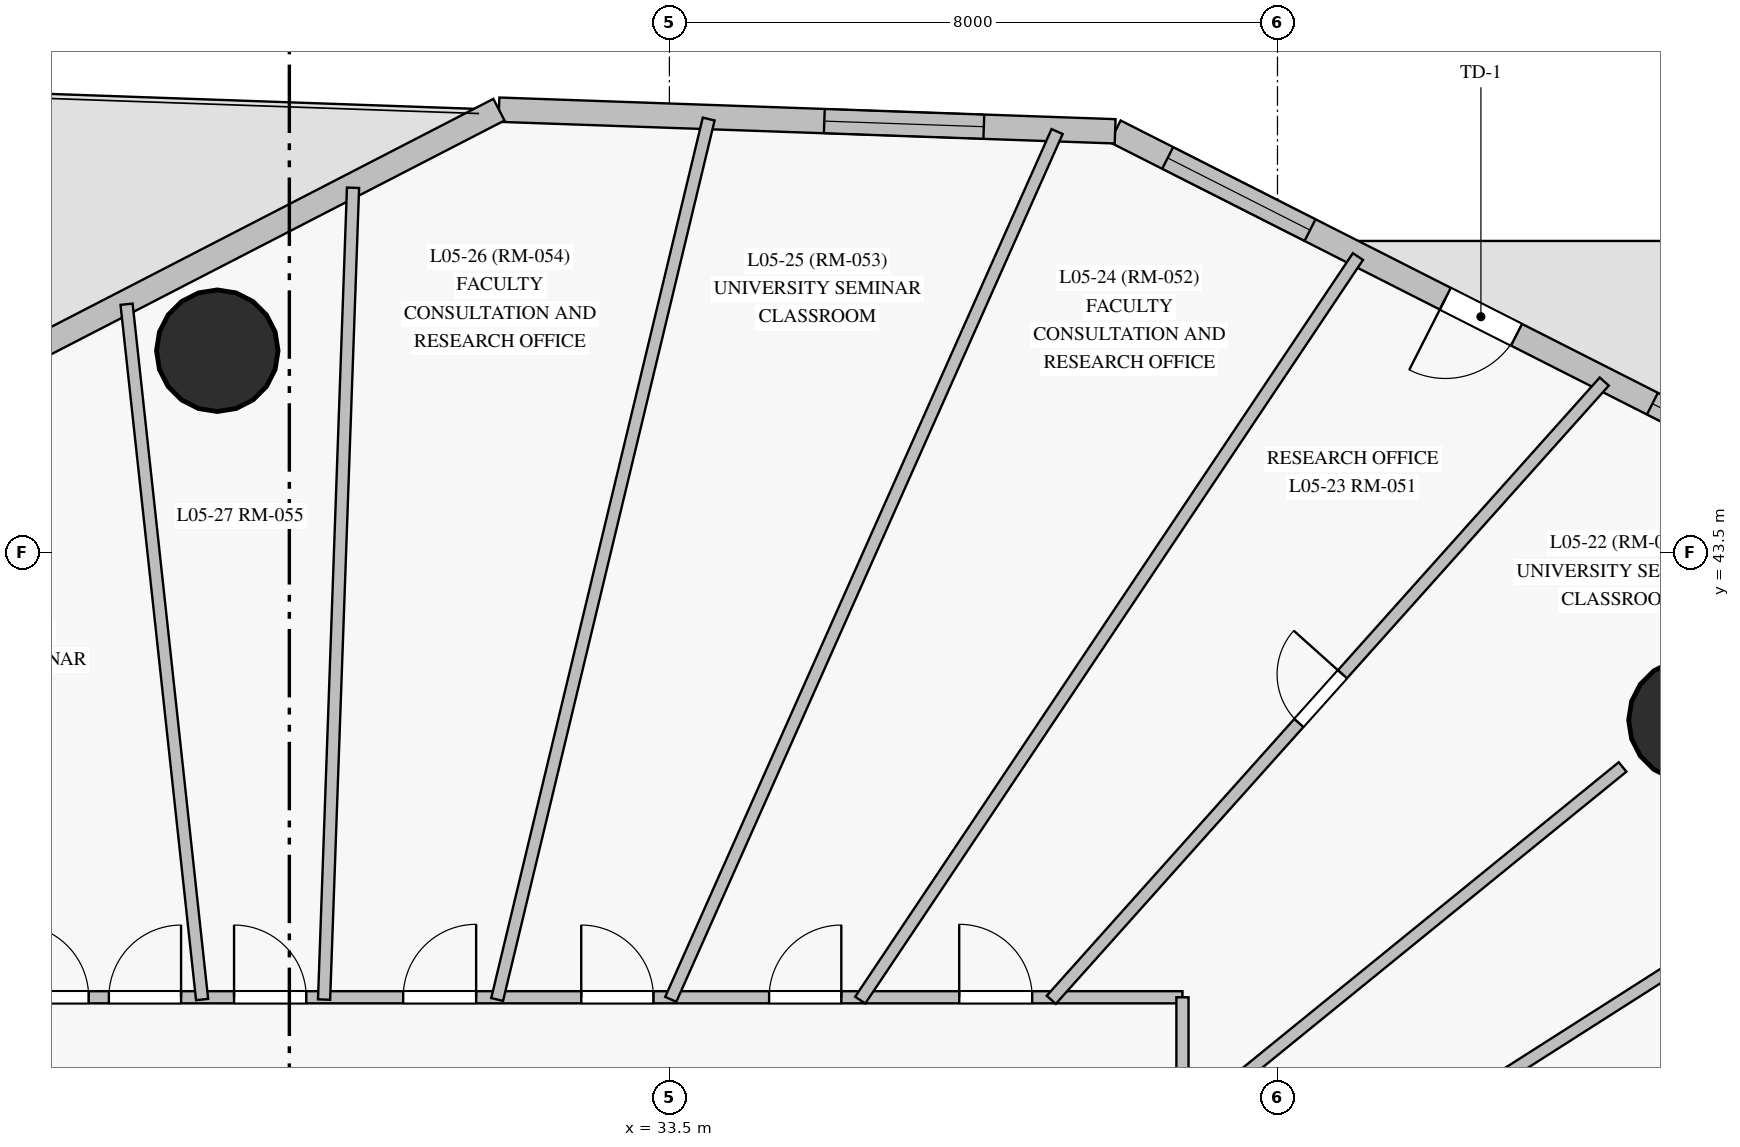
"""IFC4 building model, lengths in metres.
Left out: names, types, materials, properties, quantities, classifications, styles, units other than length and angle.
Written with IfcOpenShell. Run it as: python <this file> out.ifc"""

import sys

from ifc_helpers import new_model, si_unit, direction, frame, frame_2d, origin, origin_with_axes, origin_2d, place, context, subcontext, project, spatial, rectangle, circle, extrude, source, transform, mapped, element, fill, save


model = new_model("IFC4")
c1 = context("Model", 3, precision=1e-05, world=origin(), true_north=direction((0.0, 1.0)))
c2 = subcontext(c1, "Body", "Model", "MODEL_VIEW")
j1 = project(units=[si_unit("LENGTHUNIT", "METRE"), si_unit("PLANEANGLEUNIT", "RADIAN")], contexts=[c1])
p1 = place(None, origin())
s1 = spatial("IfcSite", under=j1, at=p1, CompositionType="ELEMENT")
p2 = place(p1, origin())
s2 = spatial("IfcBuilding", under=s1, at=p2, CompositionType="ELEMENT")
p3 = place(p2, frame((0.0, 0.0, 22.5)))
s3 = spatial("IfcBuildingStorey", under=s2, at=p3, CompositionType="ELEMENT", Elevation=22.5)
m1 = source(origin_with_axes(), c2, "Body", "SweptSolid", [
    extrude(circle(Radius=0.8, at=origin_2d()), origin(), (0.0, 0.0, 1.0), 4.0),
])
for number, where, z_axis, x_axis in (
    (1, (46.92, 41.296, 0.0), (0.0, 0.0, 1.0), (1.0, 0.0, 0.0)),
    (2, (27.552, 46.156, 0.0), (0.0, 0.0, 1.0), (1.0, 0.0, 0.0)),
):
    element("IfcColumn", number, at=place(p3, frame(where, z_axis=z_axis, x_axis=x_axis)), inside=s3, PredefinedType="COLUMN", context=c2, shape_type="MappedRepresentation", body=[
        mapped(m1, transform((0.0, 0.0, 0.0), scale=1.0)),
    ])
p4 = place(p3, frame((48.989, 44.164, 0.0), z_axis=(0.0, 0.0, 1.0), x_axis=(-0.891951959997, 0.452130181539, 0.0)))
e3 = element("IfcWall", 3, at=p4, inside=s3, PredefinedType="SOLIDWALL", context=c2, shape_type="SweptSolid", body=[
    extrude(rectangle(XDim=10.79, YDim=0.32, at=frame_2d((5.395, 0.0))), origin(), (0.0, 0.0, 1.0), 3.75),
])
p5 = place(p4, frame((0.766, 0.0, 0.85)))
e4 = element("IfcOpeningElement", 4, at=p5, cuts=e3, PredefinedType="OPENING", context=c2, shape_type="SweptSolid", body=[
    extrude(rectangle(XDim=2.1, YDim=1.95, at=frame_2d((1.05, 0.975))), frame((0.0, 0.17, 0.0), z_axis=(0.0, -1.0, 0.0), x_axis=(1.0, 0.0, 0.0)), (0.0, 0.0, 1.0), 0.34),
])
p6 = place(p4, frame((7.916, 0.0, 0.85)))
e5 = element("IfcOpeningElement", 5, at=p6, cuts=e3, PredefinedType="OPENING", context=c2, shape_type="SweptSolid", body=[
    extrude(rectangle(XDim=2.1, YDim=1.95, at=frame_2d((1.05, 0.975))), frame((0.0, 0.17, 0.0), z_axis=(0.0, -1.0, 0.0), x_axis=(1.0, 0.0, 0.0)), (0.0, 0.0, 1.0), 0.34),
])
p7 = place(p4, frame((4.87, 0.0, 0.0)))
e6 = element("IfcOpeningElement", 6, at=p7, cuts=e3, PredefinedType="OPENING", context=c2, shape_type="SweptSolid", body=[
    extrude(rectangle(XDim=1.05, YDim=2.12, at=frame_2d((0.525, 1.06))), frame((0.0, 0.17, 0.0), z_axis=(0.0, -1.0, 0.0), x_axis=(1.0, 0.0, 0.0)), (0.0, 0.0, 1.0), 0.34),
])
p8 = place(p3, frame((39.364, 49.042, 0.0), z_axis=(0.0, 0.0, 1.0), x_axis=(-0.999384031187, 0.035093563631, 0.0)))
e7 = element("IfcWall", 7, at=p8, inside=s3, PredefinedType="SOLIDWALL", context=c2, shape_type="SweptSolid", body=[
    extrude(rectangle(XDim=8.112, YDim=0.32, at=frame_2d((4.056, 0.0))), origin(), (0.0, 0.0, 1.0), 3.75),
])
p9 = place(p8, frame((1.729, 0.0, 0.85)))
e8 = element("IfcOpeningElement", 8, at=p9, cuts=e7, PredefinedType="OPENING", context=c2, shape_type="SweptSolid", body=[
    extrude(rectangle(XDim=2.1, YDim=1.95, at=frame_2d((1.05, 0.975))), frame((0.0, 0.17, 0.0), z_axis=(0.0, -1.0, 0.0), x_axis=(1.0, 0.0, 0.0)), (0.0, 0.0, 1.0), 0.34),
])
p10 = place(p3, frame((31.258, 49.327, 0.0), z_axis=(0.0, 0.0, 1.0), x_axis=(-0.888776453035, -0.458340939182, 0.0)))
e9 = element("IfcWall", 9, at=p10, inside=s3, PredefinedType="SOLIDWALL", context=c2, shape_type="SweptSolid", body=[
    extrude(rectangle(XDim=25.827, YDim=0.32, at=frame_2d((12.913, 0.0))), origin(), (0.0, 0.0, 1.0), 3.42),
])
p11 = place(p10, frame((13.281, 0.0, 0.85)))
e10 = element("IfcOpeningElement", 10, at=p11, cuts=e9, PredefinedType="OPENING", context=c2, shape_type="SweptSolid", body=[
    extrude(rectangle(XDim=2.1, YDim=1.95, at=frame_2d((1.05, 0.975))), frame((0.0, 0.17, 0.0), z_axis=(0.0, -1.0, 0.0), x_axis=(1.0, 0.0, 0.0)), (0.0, 0.0, 1.0), 0.34),
])
p12 = place(p10, frame((9.16, 0.0, 0.0)))
e11 = element("IfcOpeningElement", 11, at=p12, cuts=e9, PredefinedType="OPENING", context=c2, shape_type="SweptSolid", body=[
    extrude(rectangle(XDim=1.05, YDim=2.12, at=frame_2d((0.525, 1.06))), frame((0.0, 0.17, 0.0), z_axis=(0.0, -1.0, 0.0), x_axis=(1.0, 0.0, 0.0)), (0.0, 0.0, 1.0), 0.34),
])
p13 = place(p3, frame((10.5, 37.65, 0.0), z_axis=(0.0, 0.0, 1.0), x_axis=(1.0, 0.0, 0.0)))
e12 = element("IfcWall", 12, at=p13, inside=s3, PredefinedType="PARTITIONING", context=c2, shape_type="SweptSolid", body=[
    extrude(rectangle(XDim=29.75, YDim=0.16, at=frame_2d((14.875, 0.0))), origin(), (0.0, 0.0, 1.0), 3.15),
])
p14 = place(p13, frame((26.813, 0.0, 0.0)))
e13 = element("IfcOpeningElement", 13, at=p14, cuts=e12, PredefinedType="OPENING", context=c2, shape_type="SweptSolid", body=[
    extrude(rectangle(XDim=0.96, YDim=2.15, at=frame_2d((0.48, 1.075))), frame((0.0, 0.09, 0.0), z_axis=(0.0, -1.0, 0.0), x_axis=(1.0, 0.0, 0.0)), (0.0, 0.0, 1.0), 0.18),
])
p15 = place(p13, frame((24.312, 0.0, 0.0)))
e14 = element("IfcOpeningElement", 14, at=p15, cuts=e12, PredefinedType="OPENING", context=c2, shape_type="SweptSolid", body=[
    extrude(rectangle(XDim=0.95, YDim=2.15, at=frame_2d((0.475, 1.075))), frame((0.0, 0.09, 0.0), z_axis=(0.0, -1.0, 0.0), x_axis=(1.0, 0.0, 0.0)), (0.0, 0.0, 1.0), 0.18),
])
p16 = place(p13, frame((21.84, 0.0, 0.0)))
e15 = element("IfcOpeningElement", 15, at=p16, cuts=e12, PredefinedType="OPENING", context=c2, shape_type="SweptSolid", body=[
    extrude(rectangle(XDim=0.95, YDim=2.15, at=frame_2d((0.475, 1.075))), frame((0.0, 0.09, 0.0), z_axis=(0.0, -1.0, 0.0), x_axis=(1.0, 0.0, 0.0)), (0.0, 0.0, 1.0), 0.18),
])
p17 = place(p13, frame((19.498, 0.0, 0.0)))
e16 = element("IfcOpeningElement", 16, at=p17, cuts=e12, PredefinedType="OPENING", context=c2, shape_type="SweptSolid", body=[
    extrude(rectangle(XDim=0.96, YDim=2.15, at=frame_2d((0.48, 1.075))), frame((0.0, 0.09, 0.0), z_axis=(0.0, -1.0, 0.0), x_axis=(1.0, 0.0, 0.0)), (0.0, 0.0, 1.0), 0.18),
])
p18 = place(p13, frame((17.272, 0.0, 0.0)))
e17 = element("IfcOpeningElement", 17, at=p18, cuts=e12, PredefinedType="OPENING", context=c2, shape_type="SweptSolid", body=[
    extrude(rectangle(XDim=0.95, YDim=2.15, at=frame_2d((0.475, 1.075))), frame((0.0, 0.09, 0.0), z_axis=(0.0, -1.0, 0.0), x_axis=(1.0, 0.0, 0.0)), (0.0, 0.0, 1.0), 0.18),
])
p19 = place(p13, frame((15.625, 0.0, 0.0)))
e18 = element("IfcOpeningElement", 18, at=p19, cuts=e12, PredefinedType="OPENING", context=c2, shape_type="SweptSolid", body=[
    extrude(rectangle(XDim=0.95, YDim=2.15, at=frame_2d((0.475, 1.075))), frame((0.0, 0.09, 0.0), z_axis=(0.0, -1.0, 0.0), x_axis=(1.0, 0.0, 0.0)), (0.0, 0.0, 1.0), 0.18),
])
p20 = place(p13, frame((14.4, 0.0, 0.0)))
e19 = element("IfcOpeningElement", 19, at=p20, cuts=e12, PredefinedType="OPENING", context=c2, shape_type="SweptSolid", body=[
    extrude(rectangle(XDim=0.96, YDim=2.15, at=frame_2d((0.48, 1.075))), frame((0.0, 0.09, 0.0), z_axis=(0.0, -1.0, 0.0), x_axis=(1.0, 0.0, 0.0)), (0.0, 0.0, 1.0), 0.18),
])
p21 = place(p13, frame((9.938, 0.0, 0.0)))
e20 = element("IfcOpeningElement", 20, at=p21, cuts=e12, PredefinedType="OPENING", context=c2, shape_type="SweptSolid", body=[
    extrude(rectangle(XDim=0.95, YDim=2.15, at=frame_2d((0.475, 1.075))), frame((0.0, 0.09, 0.0), z_axis=(0.0, -1.0, 0.0), x_axis=(1.0, 0.0, 0.0)), (0.0, 0.0, 1.0), 0.18),
])
p22 = place(p3, frame((40.25, 37.65, 0.0), z_axis=(0.0, 0.0, 1.0), x_axis=(0.0, -1.0, 0.0)))
e21 = element("IfcWall", 21, at=p22, inside=s3, PredefinedType="PARTITIONING", context=c2, shape_type="SweptSolid", body=[
    extrude(rectangle(XDim=22.3, YDim=0.16, at=frame_2d((11.15, 0.0))), origin(), (0.0, 0.0, 1.0), 3.15),
])
p23 = place(p22, frame((16.25, 0.0, 0.0)))
e22 = element("IfcOpeningElement", 22, at=p23, cuts=e21, PredefinedType="OPENING", context=c2, shape_type="SweptSolid", body=[
    extrude(rectangle(XDim=0.95, YDim=2.15, at=frame_2d((0.475, 1.075))), frame((0.0, 0.09, 0.0), z_axis=(0.0, -1.0, 0.0), x_axis=(1.0, 0.0, 0.0)), (0.0, 0.0, 1.0), 0.18),
])
p24 = place(p22, frame((14.06, 0.0, 0.0)))
e23 = element("IfcOpeningElement", 23, at=p24, cuts=e21, PredefinedType="OPENING", context=c2, shape_type="SweptSolid", body=[
    extrude(rectangle(XDim=0.96, YDim=2.15, at=frame_2d((0.48, 1.075))), frame((0.0, 0.09, 0.0), z_axis=(0.0, -1.0, 0.0), x_axis=(1.0, 0.0, 0.0)), (0.0, 0.0, 1.0), 0.18),
])
p25 = place(p22, frame((12.235, 0.0, 0.0)))
e24 = element("IfcOpeningElement", 24, at=p25, cuts=e21, PredefinedType="OPENING", context=c2, shape_type="SweptSolid", body=[
    extrude(rectangle(XDim=0.95, YDim=2.15, at=frame_2d((0.475, 1.075))), frame((0.0, 0.09, 0.0), z_axis=(0.0, -1.0, 0.0), x_axis=(1.0, 0.0, 0.0)), (0.0, 0.0, 1.0), 0.18),
])
p26 = place(p22, frame((4.385, 0.0, 0.0)))
e25 = element("IfcOpeningElement", 25, at=p26, cuts=e21, PredefinedType="OPENING", context=c2, shape_type="SweptSolid", body=[
    extrude(rectangle(XDim=0.95, YDim=2.15, at=frame_2d((0.475, 1.075))), frame((0.0, 0.09, 0.0), z_axis=(0.0, -1.0, 0.0), x_axis=(1.0, 0.0, 0.0)), (0.0, 0.0, 1.0), 0.18),
])
p27 = place(p22, frame((2.19, 0.0, 0.0)))
e26 = element("IfcOpeningElement", 26, at=p27, cuts=e21, PredefinedType="OPENING", context=c2, shape_type="SweptSolid", body=[
    extrude(rectangle(XDim=0.95, YDim=2.15, at=frame_2d((0.475, 1.075))), frame((0.0, 0.09, 0.0), z_axis=(0.0, -1.0, 0.0), x_axis=(1.0, 0.0, 0.0)), (0.0, 0.0, 1.0), 0.18),
])
p28 = place(p22, frame((17.358, 0.0, 0.0)))
e27 = element("IfcOpeningElement", 27, at=p28, cuts=e21, PredefinedType="OPENING", context=c2, shape_type="SweptSolid", body=[
    extrude(rectangle(XDim=0.95, YDim=2.15, at=frame_2d((0.475, 1.075))), frame((0.0, 0.09, 0.0), z_axis=(0.0, -1.0, 0.0), x_axis=(1.0, 0.0, 0.0)), (0.0, 0.0, 1.0), 0.18),
])
p29 = place(p22, frame((18.489, 0.0, 0.0)))
e28 = element("IfcOpeningElement", 28, at=p29, cuts=e21, PredefinedType="OPENING", context=c2, shape_type="SweptSolid", body=[
    extrude(rectangle(XDim=0.95, YDim=2.15, at=frame_2d((0.475, 1.075))), frame((0.0, 0.09, 0.0), z_axis=(0.0, -1.0, 0.0), x_axis=(1.0, 0.0, 0.0)), (0.0, 0.0, 1.0), 0.18),
])
p30 = place(p22, frame((10.61, 0.0, 0.0)))
e29 = element("IfcOpeningElement", 29, at=p30, cuts=e21, PredefinedType="OPENING", context=c2, shape_type="SweptSolid", body=[
    extrude(rectangle(XDim=0.86, YDim=2.04, at=frame_2d((0.43, 1.02))), frame((0.0, 0.09, 0.0), z_axis=(0.0, -1.0, 0.0), x_axis=(1.0, 0.0, 0.0)), (0.0, 0.0, 1.0), 0.18),
])
p31 = place(p22, frame((8.378, 0.0, 0.0)))
e30 = element("IfcOpeningElement", 30, at=p31, cuts=e21, PredefinedType="OPENING", context=c2, shape_type="SweptSolid", body=[
    extrude(rectangle(XDim=0.86, YDim=2.04, at=frame_2d((0.43, 1.02))), frame((0.0, 0.09, 0.0), z_axis=(0.0, -1.0, 0.0), x_axis=(1.0, 0.0, 0.0)), (0.0, 0.0, 1.0), 0.18),
])
p32 = place(p22, frame((7.144, 0.0, 0.0)))
e31 = element("IfcOpeningElement", 31, at=p32, cuts=e21, PredefinedType="OPENING", context=c2, shape_type="SweptSolid", body=[
    extrude(rectangle(XDim=0.86, YDim=2.04, at=frame_2d((0.43, 1.02))), frame((0.0, 0.09, 0.0), z_axis=(0.0, -1.0, 0.0), x_axis=(1.0, 0.0, 0.0)), (0.0, 0.0, 1.0), 0.18),
])
p33 = place(p3, frame((40.209, 31.855, 0.0), z_axis=(0.0, 0.0, 1.0), x_axis=(0.907470894389, 0.420114955502, 0.0)))
e32 = element("IfcWall", 32, at=p33, inside=s3, PredefinedType="PARTITIONING", context=c2, shape_type="SweptSolid", body=[
    extrude(rectangle(XDim=14.266, YDim=0.16, at=frame_2d((7.133, 0.0))), origin(), (0.0, 0.0, 1.0), 3.75),
])
p34 = place(p33, frame((6.703, 0.0, 0.0)))
e33 = element("IfcOpeningElement", 33, at=p34, cuts=e32, PredefinedType="OPENING", context=c2, shape_type="SweptSolid", body=[
    extrude(rectangle(XDim=0.86, YDim=2.04, at=frame_2d((0.43, 1.02))), frame((0.0, 0.09, 0.0), z_axis=(0.0, -1.0, 0.0), x_axis=(1.0, 0.0, 0.0)), (0.0, 0.0, 1.0), 0.18),
])
p35 = place(p3, frame((40.225, 33.904, 0.0), z_axis=(0.0, 0.0, 1.0), x_axis=(0.843218121952, 0.537571575524, 0.0)))
e34 = element("IfcWall", 34, at=p35, inside=s3, PredefinedType="PARTITIONING", context=c2, shape_type="SweptSolid", body=[
    extrude(rectangle(XDim=12.955, YDim=0.16, at=frame_2d((6.478, 0.0))), origin(), (0.0, 0.0, 1.0), 3.75),
])
p36 = place(p3, frame((33.518, 37.623, 0.0), z_axis=(0.0, 0.0, 1.0), x_axis=(0.40672565057, 0.913550351742, 0.0)))
e35 = element("IfcWall", 35, at=p36, inside=s3, PredefinedType="PARTITIONING", context=c2, shape_type="SweptSolid", body=[
    extrude(rectangle(XDim=12.497, YDim=0.16, at=frame_2d((6.249, 0.0))), origin(), (0.0, 0.0, 1.0), 3.75),
])
p37 = place(p3, frame((31.234, 37.621, 0.0), z_axis=(0.0, 0.0, 1.0), x_axis=(0.233633384218, 0.972324761476, 0.0)))
e36 = element("IfcWall", 36, at=p37, inside=s3, PredefinedType="PARTITIONING", context=c2, shape_type="SweptSolid", body=[
    extrude(rectangle(XDim=11.913, YDim=0.16, at=frame_2d((5.956, 0.0))), origin(), (0.0, 0.0, 1.0), 3.75),
])
p38 = place(p3, frame((36.01, 37.613, 0.0), z_axis=(0.0, 0.0, 1.0), x_axis=(0.556249955488, 0.831015034172, 0.0)))
e37 = element("IfcWall", 37, at=p38, inside=s3, PredefinedType="PARTITIONING", context=c2, shape_type="SweptSolid", body=[
    extrude(rectangle(XDim=11.771, YDim=0.16, at=frame_2d((5.886, 0.0))), origin(), (0.0, 0.0, 1.0), 3.75),
])
p39 = place(p3, frame((38.524, 37.616, 0.0), z_axis=(0.0, 0.0, 1.0), x_axis=(0.666694800969, 0.745330827459, 0.0)))
e38 = element("IfcWall", 38, at=p39, inside=s3, PredefinedType="PARTITIONING", context=c2, shape_type="SweptSolid", body=[
    extrude(rectangle(XDim=10.913, YDim=0.16, at=frame_2d((5.457, 0.0))), origin(), (0.0, 0.0, 1.0), 3.75),
])
p40 = place(p39, frame((4.886, 0.0, 0.0)))
e39 = element("IfcOpeningElement", 39, at=p40, cuts=e38, PredefinedType="OPENING", context=c2, shape_type="SweptSolid", body=[
    extrude(rectangle(XDim=0.86, YDim=2.04, at=frame_2d((0.43, 1.02))), frame((0.0, 0.09, 0.0), z_axis=(0.0, -1.0, 0.0), x_axis=(1.0, 0.0, 0.0)), (0.0, 0.0, 1.0), 0.18),
])
p41 = place(p3, frame((28.957, 37.62, 0.0), z_axis=(0.0, 0.0, 1.0), x_axis=(0.035640191825, 0.999364686552, 0.0)))
e40 = element("IfcWall", 40, at=p41, inside=s3, PredefinedType="PARTITIONING", context=c2, shape_type="SweptSolid", body=[
    extrude(rectangle(XDim=10.686, YDim=0.16, at=frame_2d((5.343, 0.0))), origin(), (0.0, 0.0, 1.0), 3.75),
])
p42 = place(p3, frame((27.352, 37.62, 0.0), z_axis=(0.0, 0.0, 1.0), x_axis=(-0.107990771292, 0.994151896501, 0.0)))
e41 = element("IfcWall", 41, at=p42, inside=s3, PredefinedType="PARTITIONING", context=c2, shape_type="SweptSolid", body=[
    extrude(rectangle(XDim=9.201, YDim=0.16, at=frame_2d((4.601, 0.0))), origin(), (0.0, 0.0, 1.0), 3.1),
])
p43 = place(p3, frame((40.215, 35.945, 0.0), z_axis=(0.0, 0.0, 1.0), x_axis=(0.77599360837, 0.630740770657, 0.0)))
e42 = element("IfcWall", 42, at=p43, inside=s3, PredefinedType="PARTITIONING", context=c2, shape_type="SweptSolid", body=[
    extrude(rectangle(XDim=7.506, YDim=0.16, at=frame_2d((3.753, 0.0))), origin(), (0.0, 0.0, 1.0), 3.1),
])
m2 = source(origin_with_axes(), c2, "Body", "SweptSolid", [
    extrude(rectangle(XDim=2.1, YDim=1.95, at=frame_2d((1.05, 0.975))), frame((0.0, 0.03, 0.0), z_axis=(0.0, -1.0, 0.0), x_axis=(1.0, 0.0, 0.0)), (0.0, 0.0, 1.0), 0.06),
])
p44 = place(p5, origin())
e43 = element("IfcWindow", 43, at=p44, inside=s3, PartitioningType="SINGLE_PANEL", PredefinedType="WINDOW", context=c2, shape_type="MappedRepresentation", body=[
    mapped(m2, transform((0.0, 0.0, 0.0), scale=1.0)),
])
fill(e4, e43)
p45 = place(p6, origin())
e44 = element("IfcWindow", 44, at=p45, inside=s3, PartitioningType="SINGLE_PANEL", PredefinedType="WINDOW", context=c2, shape_type="MappedRepresentation", body=[
    mapped(m2, transform((0.0, 0.0, 0.0), scale=1.0)),
])
fill(e5, e44)
p46 = place(p9, origin())
e45 = element("IfcWindow", 45, at=p46, inside=s3, PartitioningType="SINGLE_PANEL", PredefinedType="WINDOW", context=c2, shape_type="MappedRepresentation", body=[
    mapped(m2, transform((0.0, 0.0, 0.0), scale=1.0)),
])
fill(e8, e45)
m3 = source(origin_with_axes(), c2, "Body", "SweptSolid", [
    extrude(rectangle(XDim=1.05, YDim=2.12, at=frame_2d((0.525, 1.06))), frame((0.0, 0.025, 0.0), z_axis=(0.0, -1.0, 0.0), x_axis=(1.0, 0.0, 0.0)), (0.0, 0.0, 1.0), 0.05),
])
p47 = place(p7, origin())
e46 = element("IfcDoor", 46, at=p47, inside=s3, OperationType="SINGLE_SWING_RIGHT", PredefinedType="DOOR", context=c2, shape_type="MappedRepresentation", body=[
    mapped(m3, transform((0.0, 0.0, 0.0), scale=1.0)),
])
fill(e6, e46)
m4 = source(origin_with_axes(), c2, "Body", "SweptSolid", [
    extrude(rectangle(XDim=0.96, YDim=2.15, at=frame_2d((0.48, 1.075))), frame((0.0, 0.025, 0.0), z_axis=(0.0, -1.0, 0.0), x_axis=(1.0, 0.0, 0.0)), (0.0, 0.0, 1.0), 0.05),
])
p48 = place(p14, origin())
e47 = element("IfcDoor", 47, at=p48, inside=s3, OperationType="SINGLE_SWING_LEFT", PredefinedType="DOOR", context=c2, shape_type="MappedRepresentation", body=[
    mapped(m4, transform((0.0, 0.0, 0.0), scale=1.0)),
])
fill(e13, e47)
m5 = source(origin_with_axes(), c2, "Body", "SweptSolid", [
    extrude(rectangle(XDim=0.95, YDim=2.15, at=frame_2d((0.475, 1.075))), frame((0.0, 0.025, 0.0), z_axis=(0.0, -1.0, 0.0), x_axis=(1.0, 0.0, 0.0)), (0.0, 0.0, 1.0), 0.05),
])
p49 = place(p15, origin())
e48 = element("IfcDoor", 48, at=p49, inside=s3, OperationType="SINGLE_SWING_RIGHT", PredefinedType="DOOR", context=c2, shape_type="MappedRepresentation", body=[
    mapped(m5, transform((0.0, 0.0, 0.0), scale=1.0)),
])
fill(e14, e48)
p50 = place(p16, origin())
e49 = element("IfcDoor", 49, at=p50, inside=s3, OperationType="SINGLE_SWING_LEFT", PredefinedType="DOOR", context=c2, shape_type="MappedRepresentation", body=[
    mapped(m5, transform((0.0, 0.0, 0.0), scale=1.0)),
])
fill(e15, e49)
p51 = place(p17, origin())
e50 = element("IfcDoor", 50, at=p51, inside=s3, OperationType="SINGLE_SWING_RIGHT", PredefinedType="DOOR", context=c2, shape_type="MappedRepresentation", body=[
    mapped(m4, transform((0.0, 0.0, 0.0), scale=1.0)),
])
fill(e16, e50)
p52 = place(p18, origin())
e51 = element("IfcDoor", 51, at=p52, inside=s3, OperationType="SINGLE_SWING_LEFT", PredefinedType="DOOR", context=c2, shape_type="MappedRepresentation", body=[
    mapped(m5, transform((0.0, 0.0, 0.0), scale=1.0)),
])
fill(e17, e51)
p53 = place(p19, origin())
e52 = element("IfcDoor", 52, at=p53, inside=s3, OperationType="SINGLE_SWING_RIGHT", PredefinedType="DOOR", context=c2, shape_type="MappedRepresentation", body=[
    mapped(m5, transform((0.0, 0.0, 0.0), scale=1.0)),
])
fill(e18, e52)
p54 = place(p20, origin())
e53 = element("IfcDoor", 53, at=p54, inside=s3, OperationType="SINGLE_SWING_LEFT", PredefinedType="DOOR", context=c2, shape_type="MappedRepresentation", body=[
    mapped(m4, transform((0.0, 0.0, 0.0), scale=1.0)),
])
fill(e19, e53)
m6 = source(origin_with_axes(), c2, "Body", "SweptSolid", [
    extrude(rectangle(XDim=0.86, YDim=2.04, at=frame_2d((0.43, 1.02))), frame((0.0, 0.025, 0.0), z_axis=(0.0, -1.0, 0.0), x_axis=(1.0, 0.0, 0.0)), (0.0, 0.0, 1.0), 0.05),
])
p55 = place(p40, origin())
e54 = element("IfcDoor", 54, at=p55, inside=s3, OperationType="SINGLE_SWING_RIGHT", PredefinedType="DOOR", context=c2, shape_type="MappedRepresentation", body=[
    mapped(m6, transform((0.0, 0.0, 0.0), scale=1.0)),
])
fill(e39, e54)
save(model, sys.argv[1])
